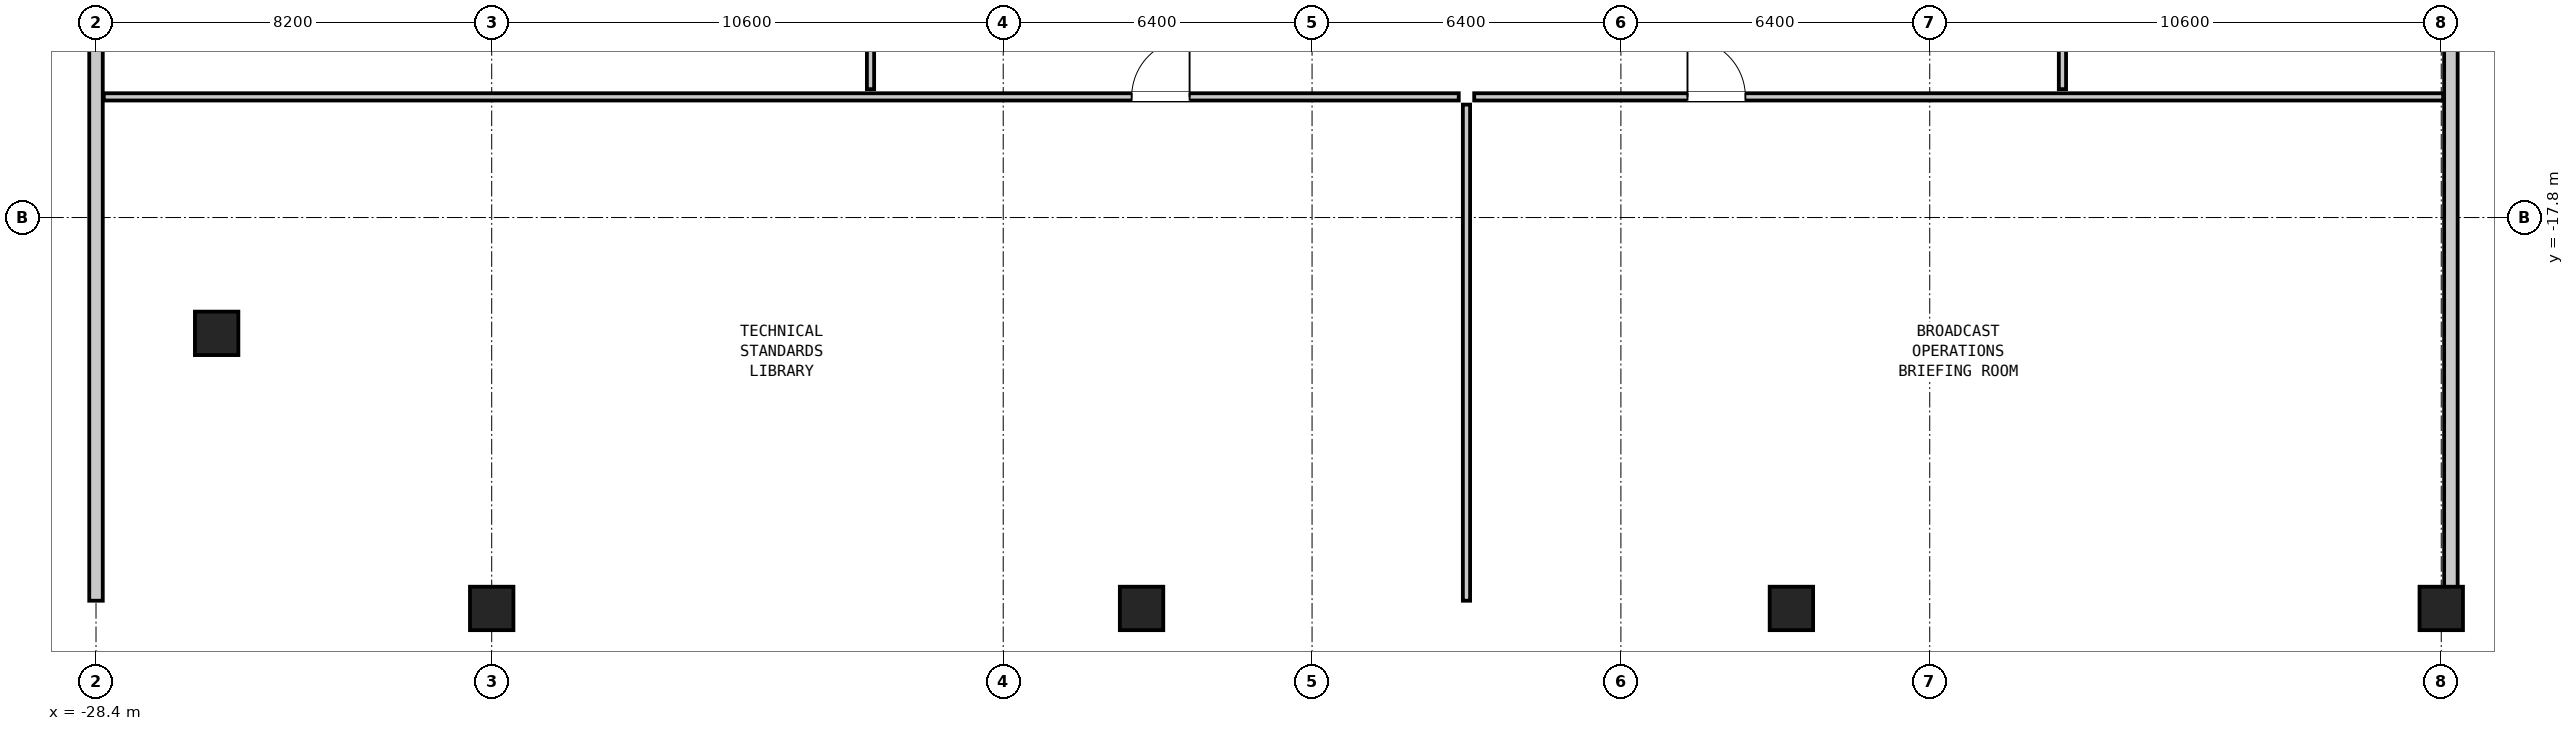
"""IFC4 building model, lengths in metres.
Left out: names, types, materials, properties, quantities, classifications, styles, units other than length and angle.
Written with IfcOpenShell. Run it as: python <this file> out.ifc"""

import sys

from ifc_helpers import new_model, si_unit, direction, frame, frame_2d, origin, origin_2d, place, context, subcontext, project, spatial, rectangle, hollow_rectangle, extrude, element, fill, save


model = new_model("IFC4")
c1 = context("Model", 3, precision=1e-05, world=origin(), true_north=direction((0.0, 1.0)))
c2 = subcontext(c1, "Body", "Model", "MODEL_VIEW")
j1 = project(units=[si_unit("LENGTHUNIT", "METRE"), si_unit("PLANEANGLEUNIT", "RADIAN")], contexts=[c1])
p1 = place(None, origin())
s1 = spatial("IfcSite", under=j1, at=p1, CompositionType="ELEMENT")
p2 = place(p1, origin())
s2 = spatial("IfcBuilding", under=s1, at=p2, CompositionType="ELEMENT")
p3 = place(p2, frame((0.0, 0.0, 21.9)))
s3 = spatial("IfcBuildingStorey", under=s2, at=p3, CompositionType="ELEMENT", Elevation=21.9)
for number, where, z_axis, x_axis in (
    (1, (-20.2, -25.9, 0.0), (0.0, 0.0, 1.0), (1.0, 0.0, 0.0)),
    (2, (-6.733, -25.9, 0.0), (0.0, 0.0, 1.0), (1.0, 0.0, 0.0)),
    (3, (6.733, -25.9, 0.0), (0.0, 0.0, 1.0), (1.0, 0.0, 0.0)),
    (4, (20.2, -25.9, 0.0), (0.0, 0.0, 1.0), (1.0, 0.0, 0.0)),
    (5, (-25.9, -20.2, 0.0), (0.0, 0.0, 1.0), (0.0, 1.0, 0.0)),
):
    element("IfcColumn", number, at=place(p3, frame(where, z_axis=z_axis, x_axis=x_axis)), inside=s3, PredefinedType="COLUMN", context=c2, shape_type="SweptSolid", body=[
        extrude(hollow_rectangle(XDim=0.9, YDim=0.9, WallThickness=0.055, at=origin_2d()), origin(), (0.0, 0.0, 1.0), 4.2),
    ])
p4 = place(p3, frame((-28.4, -25.74, 0.0), z_axis=(0.0, 0.0, 1.0), x_axis=(0.0, 1.0, 0.0)))
e6 = element("IfcWall", 6, at=p4, inside=s3, PredefinedType="MOVABLE", context=c2, shape_type="SweptSolid", body=[
    extrude(rectangle(XDim=51.48, YDim=0.28, at=frame_2d((25.74, 0.0))), origin(), (0.0, 0.0, 1.0), 3.98),
])
p5 = place(p4, frame((25.255, 0.0, 0.0)))
e7 = element("IfcOpeningElement", 7, at=p5, cuts=e6, PredefinedType="OPENING", context=c2, shape_type="SweptSolid", body=[
    extrude(rectangle(XDim=2.0, YDim=2.14, at=frame_2d((1.0, 1.07))), frame((0.0, 0.152, 0.0), z_axis=(0.0, -1.0, 0.0), x_axis=(1.0, 0.0, 0.0)), (0.0, 0.0, 1.0), 0.304),
])
p6 = place(p3, frame((20.4, -25.74, 0.0), z_axis=(0.0, 0.0, 1.0), x_axis=(0.0, 1.0, 0.0)))
e8 = element("IfcWall", 8, at=p6, inside=s3, PredefinedType="MOVABLE", context=c2, shape_type="SweptSolid", body=[
    extrude(rectangle(XDim=51.48, YDim=0.28, at=frame_2d((25.74, 0.0))), origin(), (0.0, 0.0, 1.0), 3.98),
])
p7 = place(p6, frame((25.255, 0.0, 0.0)))
e9 = element("IfcOpeningElement", 9, at=p7, cuts=e8, PredefinedType="OPENING", context=c2, shape_type="SweptSolid", body=[
    extrude(rectangle(XDim=2.0, YDim=2.14, at=frame_2d((1.0, 1.07))), frame((0.0, 0.152, 0.0), z_axis=(0.0, -1.0, 0.0), x_axis=(1.0, 0.0, 0.0)), (0.0, 0.0, 1.0), 0.304),
])
p8 = place(p3, frame((-28.24, -15.3, 0.0), z_axis=(0.0, 0.0, 1.0), x_axis=(1.0, 0.0, 0.0)))
e10 = element("IfcWall", 10, at=p8, inside=s3, PredefinedType="PARTITIONING", context=c2, shape_type="SweptSolid", body=[
    extrude(rectangle(XDim=28.08, YDim=0.15, at=frame_2d((14.04, 0.0))), origin(), (0.0, 0.0, 1.0), 3.98),
])
p9 = place(p8, frame((21.302, 0.0, 0.0)))
e11 = element("IfcOpeningElement", 11, at=p9, cuts=e10, PredefinedType="OPENING", context=c2, shape_type="SweptSolid", body=[
    extrude(rectangle(XDim=1.2, YDim=2.1, at=frame_2d((0.6, 1.05))), frame((0.0, 0.087, 0.0), z_axis=(0.0, -1.0, 0.0), x_axis=(1.0, 0.0, 0.0)), (0.0, 0.0, 1.0), 0.174),
])
p10 = place(p3, frame((0.16, -15.3, 0.0), z_axis=(0.0, 0.0, 1.0), x_axis=(1.0, 0.0, 0.0)))
e12 = element("IfcWall", 12, at=p10, inside=s3, PredefinedType="PARTITIONING", context=c2, shape_type="SweptSolid", body=[
    extrude(rectangle(XDim=20.08, YDim=0.15, at=frame_2d((10.04, 0.0))), origin(), (0.0, 0.0, 1.0), 3.98),
])
p11 = place(p10, frame((4.42, 0.0, 0.0)))
e13 = element("IfcOpeningElement", 13, at=p11, cuts=e12, PredefinedType="OPENING", context=c2, shape_type="SweptSolid", body=[
    extrude(rectangle(XDim=1.2, YDim=2.1, at=frame_2d((0.6, 1.05))), frame((0.0, 0.087, 0.0), z_axis=(0.0, -1.0, 0.0), x_axis=(1.0, 0.0, 0.0)), (0.0, 0.0, 1.0), 0.174),
])
p12 = place(p3, frame((0.0, -25.74, 0.0), z_axis=(0.0, 0.0, 1.0), x_axis=(0.0, 1.0, 0.0)))
e14 = element("IfcWall", 14, at=p12, inside=s3, PredefinedType="PARTITIONING", context=c2, shape_type="SweptSolid", body=[
    extrude(rectangle(XDim=10.28, YDim=0.15, at=frame_2d((5.14, 0.0))), origin(), (0.0, 0.0, 1.0), 3.424),
])
p13 = place(p3, frame((-12.35, -15.14, 0.0), z_axis=(0.0, 0.0, 1.0), x_axis=(0.0, 1.0, 0.0)))
e15 = element("IfcWall", 15, at=p13, inside=s3, PredefinedType="PARTITIONING", context=c2, shape_type="SweptSolid", body=[
    extrude(rectangle(XDim=12.58, YDim=0.15, at=frame_2d((6.29, 0.0))), origin(), (0.0, 0.0, 1.0), 3.98),
])
p14 = place(p13, frame((5.815, 0.0, 0.0)))
e16 = element("IfcOpeningElement", 16, at=p14, cuts=e15, PredefinedType="OPENING", context=c2, shape_type="SweptSolid", body=[
    extrude(rectangle(XDim=0.95, YDim=2.1, at=frame_2d((0.475, 1.05))), frame((0.0, 0.087, 0.0), z_axis=(0.0, -1.0, 0.0), x_axis=(1.0, 0.0, 0.0)), (0.0, 0.0, 1.0), 0.174),
])
p15 = place(p3, frame((12.35, -15.14, 0.0), z_axis=(0.0, 0.0, 1.0), x_axis=(0.0, 1.0, 0.0)))
e17 = element("IfcWall", 17, at=p15, inside=s3, PredefinedType="PARTITIONING", context=c2, shape_type="SweptSolid", body=[
    extrude(rectangle(XDim=12.6, YDim=0.15, at=frame_2d((6.3, 0.0))), origin(), (0.0, 0.0, 1.0), 3.98),
])
p16 = place(p15, frame((5.825, 0.0, 0.0)))
e18 = element("IfcOpeningElement", 18, at=p16, cuts=e17, PredefinedType="OPENING", context=c2, shape_type="SweptSolid", body=[
    extrude(rectangle(XDim=0.95, YDim=2.1, at=frame_2d((0.475, 1.05))), frame((0.0, 0.087, 0.0), z_axis=(0.0, -1.0, 0.0), x_axis=(1.0, 0.0, 0.0)), (0.0, 0.0, 1.0), 0.174),
])
p17 = place(p9, origin())
e19 = element("IfcDoor", 19, at=p17, inside=s3, OperationType="SINGLE_SWING_RIGHT", PredefinedType="DOOR", context=c2, shape_type="SweptSolid", body=[
    extrude(rectangle(XDim=1.2, YDim=2.1, at=frame_2d((0.6, 1.05))), frame((0.0, 0.025, 0.0), z_axis=(0.0, -1.0, 0.0), x_axis=(1.0, 0.0, 0.0)), (0.0, 0.0, 1.0), 0.05),
])
fill(e11, e19)
p18 = place(p11, origin())
e20 = element("IfcDoor", 20, at=p18, inside=s3, OperationType="SINGLE_SWING_LEFT", PredefinedType="DOOR", context=c2, shape_type="SweptSolid", body=[
    extrude(rectangle(XDim=1.2, YDim=2.1, at=frame_2d((0.6, 1.05))), frame((0.0, 0.025, 0.0), z_axis=(0.0, -1.0, 0.0), x_axis=(1.0, 0.0, 0.0)), (0.0, 0.0, 1.0), 0.05),
])
fill(e13, e20)
save(model, sys.argv[1])
